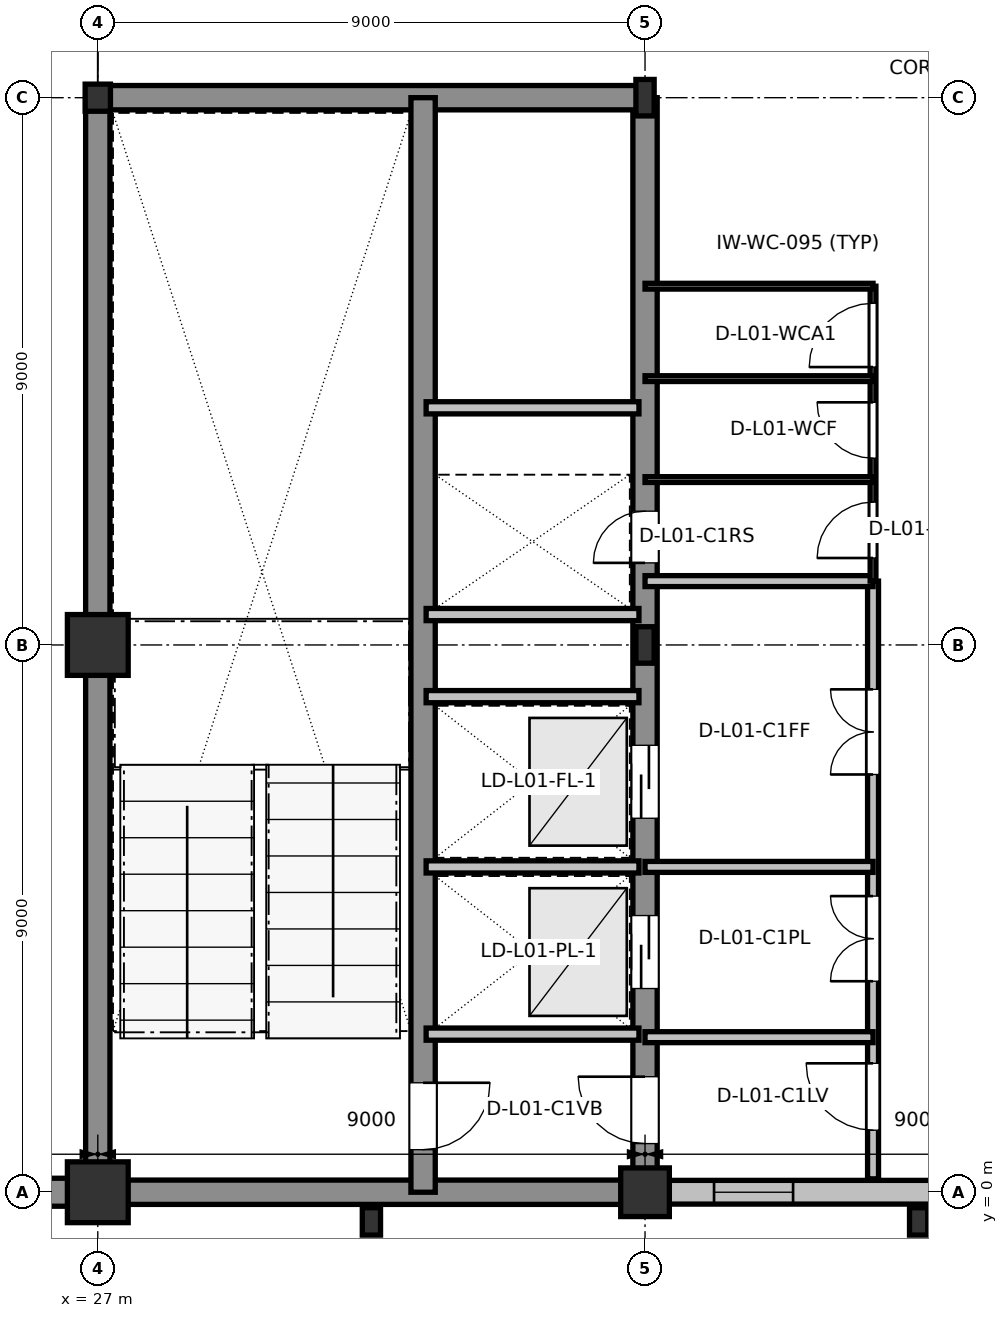
"""IFC4 building model, lengths in metres.
Left out: names, types, materials, properties, quantities, classifications, styles, units other than length and angle.
Written with IfcOpenShell. Run it as: python <this file> out.ifc"""

import sys

from ifc_helpers import new_model, si_unit, direction, frame, frame_2d, origin, origin_2d, place, context, subcontext, project, spatial, rectangle, i_section, extrude, element, fill, save


model = new_model("IFC4")
c1 = context("Model", 3, precision=1e-05, world=origin(), true_north=direction((0.0, 1.0)))
c2 = subcontext(c1, "Body", "Model", "MODEL_VIEW")
j1 = project(units=[si_unit("LENGTHUNIT", "METRE"), si_unit("PLANEANGLEUNIT", "RADIAN")], contexts=[c1])
p1 = place(None, origin())
s1 = spatial("IfcSite", under=j1, at=p1, CompositionType="ELEMENT")
p2 = place(p1, origin())
s2 = spatial("IfcBuilding", under=s1, at=p2, CompositionType="ELEMENT")
p3 = place(p2, frame((0.0, 0.0, 5.4)))
s3 = spatial("IfcBuildingStorey", under=s2, at=p3, CompositionType="ELEMENT", Elevation=5.4)
for number, where, z_axis, x_axis in (
    (1, (31.5, -0.48, 0.0), (0.0, 0.0, 1.0), (1.0, 0.0, 0.0)),
    (2, (40.5, -0.48, 0.0), (0.0, 0.0, 1.0), (1.0, 0.0, 0.0)),
):
    element("IfcColumn", number, at=place(p3, frame(where, z_axis=z_axis, x_axis=x_axis)), inside=s3, PredefinedType="PILASTER", context=c2, shape_type="SweptSolid", body=[
        extrude(rectangle(XDim=0.3, YDim=0.45, at=origin_2d()), origin(), (0.0, 0.0, 1.0), 4.8),
    ])
for number, where, z_axis, x_axis in (
    (3, (27.0, 0.0, 0.0), (0.0, 0.0, 1.0), (1.0, 0.0, 0.0)),
    (4, (27.0, 9.0, 0.0), (0.0, 0.0, 1.0), (1.0, 0.0, 0.0)),
):
    element("IfcColumn", number, at=place(p3, frame(where, z_axis=z_axis, x_axis=x_axis)), inside=s3, PredefinedType="COLUMN", context=c2, shape_type="SweptSolid", body=[
        extrude(rectangle(XDim=1.0, YDim=1.0, at=origin_2d()), origin(), (0.0, 0.0, 1.0), 4.8),
    ])
p4 = place(p3, frame((27.0, 18.0, 0.0), z_axis=(0.0, 0.0, 1.0), x_axis=(1.0, 0.0, 0.0)))
e5 = element("IfcColumn", 5, at=p4, inside=s3, PredefinedType="COLUMN", context=c2, shape_type="SweptSolid", body=[
    extrude(i_section(OverallWidth=0.416, OverallDepth=0.446, WebThickness=0.025, FlangeThickness=0.04, at=origin_2d()), origin(), (0.0, 0.0, 1.0), 4.8),
])
p5 = place(p3, frame((36.0, 0.0, 0.0), z_axis=(0.0, 0.0, 1.0), x_axis=(1.0, 0.0, 0.0)))
e6 = element("IfcColumn", 6, at=p5, inside=s3, PredefinedType="COLUMN", context=c2, shape_type="SweptSolid", body=[
    extrude(rectangle(XDim=0.8, YDim=0.8, at=origin_2d()), origin(), (0.0, 0.0, 1.0), 4.8),
])
for number, where, z_axis, x_axis in (
    (7, (36.0, 9.0, 0.0), (0.0, 0.0, 1.0), (1.0, 0.0, 0.0)),
    (8, (36.0, 18.0, 0.0), (0.0, 0.0, 1.0), (1.0, 0.0, 0.0)),
):
    element("IfcColumn", number, at=place(p3, frame(where, z_axis=z_axis, x_axis=x_axis)), inside=s3, PredefinedType="COLUMN", context=c2, shape_type="SweptSolid", body=[
        extrude(i_section(OverallWidth=0.3, OverallDepth=0.6, WebThickness=0.015, FlangeThickness=0.03, at=origin_2d()), origin(), (0.0, 0.0, 1.0), 4.8),
    ])
p6 = place(p3, frame((18.335, 0.0, 0.0), z_axis=(0.0, 0.0, 1.0), x_axis=(1.0, 0.0, 0.0)))
e9 = element("IfcWall", 9, at=p6, inside=s3, PredefinedType="STANDARD", context=c2, shape_type="SweptSolid", body=[
    extrude(rectangle(XDim=8.18, YDim=0.46, at=frame_2d((4.09, 0.0))), origin(), (0.0, 0.0, 1.0), 4.8),
])
p7 = place(p3, frame((36.385, 0.0, 0.0), z_axis=(0.0, 0.0, 1.0), x_axis=(1.0, 0.0, 0.0)))
e10 = element("IfcWall", 10, at=p7, inside=s3, PredefinedType="STANDARD", context=c2, shape_type="SweptSolid", body=[
    extrude(rectangle(XDim=8.23, YDim=0.39, at=frame_2d((4.115, 0.0))), origin(), (0.0, 0.0, 1.0), 3.495),
])
p8 = place(p7, frame((0.75, 0.0, 0.9)))
e11 = element("IfcOpeningElement", 11, at=p8, cuts=e10, PredefinedType="OPENING", context=c2, shape_type="SweptSolid", body=[
    extrude(rectangle(XDim=1.3, YDim=1.85, at=frame_2d((0.65, 0.925))), frame((0.0, 0.205, 0.0), z_axis=(0.0, -1.0, 0.0), x_axis=(1.0, 0.0, 0.0)), (0.0, 0.0, 1.0), 0.41),
])
p9 = place(p3, frame((27.0, 0.0, 0.0), z_axis=(0.0, 0.0, 1.0), x_axis=(1.0, 0.0, 0.0)))
e12 = element("IfcWall", 12, at=p9, inside=s3, PredefinedType="SHEAR", context=c2, shape_type="SweptSolid", body=[
    extrude(rectangle(XDim=9.0, YDim=0.4, at=frame_2d((4.5, 0.0))), origin(), (0.0, 0.0, 1.0), 4.56),
])
p10 = place(p3, frame((36.0, 0.0, 0.0), z_axis=(0.0, 0.0, 1.0), x_axis=(0.0, 1.0, 0.0)))
e13 = element("IfcWall", 13, at=p10, inside=s3, PredefinedType="SHEAR", context=c2, shape_type="SweptSolid", body=[
    extrude(rectangle(XDim=18.0, YDim=0.4, at=frame_2d((9.0, 0.0))), origin(), (0.0, 0.0, 1.0), 4.56),
])
p11 = place(p10, frame((0.8, 0.0, 0.0)))
e14 = element("IfcOpeningElement", 14, at=p11, cuts=e13, PredefinedType="OPENING", context=c2, shape_type="SweptSolid", body=[
    extrude(rectangle(XDim=1.1, YDim=2.16, at=frame_2d((0.55, 1.08))), frame((0.0, 0.21, 0.0), z_axis=(0.0, -1.0, 0.0), x_axis=(1.0, 0.0, 0.0)), (0.0, 0.0, 1.0), 0.42),
])
p12 = place(p10, frame((3.35, 0.0, 0.0)))
e15 = element("IfcOpeningElement", 15, at=p12, cuts=e13, PredefinedType="OPENING", context=c2, shape_type="SweptSolid", body=[
    extrude(rectangle(XDim=1.2, YDim=2.2, at=frame_2d((0.6, 1.1))), frame((0.0, 0.21, 0.0), z_axis=(0.0, -1.0, 0.0), x_axis=(1.0, 0.0, 0.0)), (0.0, 0.0, 1.0), 0.42),
])
p13 = place(p10, frame((6.15, 0.0, 0.0)))
e16 = element("IfcOpeningElement", 16, at=p13, cuts=e13, PredefinedType="OPENING", context=c2, shape_type="SweptSolid", body=[
    extrude(rectangle(XDim=1.2, YDim=2.2, at=frame_2d((0.6, 1.1))), frame((0.0, 0.21, 0.0), z_axis=(0.0, -1.0, 0.0), x_axis=(1.0, 0.0, 0.0)), (0.0, 0.0, 1.0), 0.42),
])
p14 = place(p10, frame((10.35, 0.0, 0.0)))
e17 = element("IfcOpeningElement", 17, at=p14, cuts=e13, PredefinedType="OPENING", context=c2, shape_type="SweptSolid", body=[
    extrude(rectangle(XDim=0.85, YDim=2.1, at=frame_2d((0.425, 1.05))), frame((0.0, 0.21, 0.0), z_axis=(0.0, -1.0, 0.0), x_axis=(1.0, 0.0, 0.0)), (0.0, 0.0, 1.0), 0.42),
])
p15 = place(p3, frame((36.0, 18.0, 0.0), z_axis=(0.0, 0.0, 1.0), x_axis=(-1.0, 0.0, 0.0)))
e18 = element("IfcWall", 18, at=p15, inside=s3, PredefinedType="SHEAR", context=c2, shape_type="SweptSolid", body=[
    extrude(rectangle(XDim=9.0, YDim=0.4, at=frame_2d((4.5, 0.0))), origin(), (0.0, 0.0, 1.0), 4.56),
])
p16 = place(p3, frame((27.0, 18.0, 0.0), z_axis=(0.0, 0.0, 1.0), x_axis=(0.0, -1.0, 0.0)))
e19 = element("IfcWall", 19, at=p16, inside=s3, PredefinedType="SHEAR", context=c2, shape_type="SweptSolid", body=[
    extrude(rectangle(XDim=18.0, YDim=0.4, at=frame_2d((9.0, 0.0))), origin(), (0.0, 0.0, 1.0), 4.56),
])
p17 = place(p3, frame((32.35, 0.0, 0.0), z_axis=(0.0, 0.0, 1.0), x_axis=(0.0, 1.0, 0.0)))
e20 = element("IfcWall", 20, at=p17, inside=s3, PredefinedType="SHEAR", context=c2, shape_type="SweptSolid", body=[
    extrude(rectangle(XDim=18.0, YDim=0.4, at=frame_2d((9.0, 0.0))), origin(), (0.0, 0.0, 1.0), 4.56),
])
p18 = place(p17, frame((0.7, 0.0, 0.0)))
e21 = element("IfcOpeningElement", 21, at=p18, cuts=e20, PredefinedType="OPENING", context=c2, shape_type="SweptSolid", body=[
    extrude(rectangle(XDim=1.1, YDim=2.16, at=frame_2d((0.55, 1.08))), frame((0.0, 0.21, 0.0), z_axis=(0.0, -1.0, 0.0), x_axis=(1.0, 0.0, 0.0)), (0.0, 0.0, 1.0), 0.42),
])
for number, where, z_axis, x_axis in (
    (22, (32.4, 2.6, 0.0), (0.0, 0.0, 1.0), (1.0, 0.0, 0.0)),
    (23, (32.4, 5.35, 0.0), (0.0, 0.0, 1.0), (1.0, 0.0, 0.0)),
    (24, (32.4, 8.15, 0.0), (0.0, 0.0, 1.0), (1.0, 0.0, 0.0)),
    (25, (32.4, 9.5, 0.0), (0.0, 0.0, 1.0), (1.0, 0.0, 0.0)),
    (26, (32.4, 12.9, 0.0), (0.0, 0.0, 1.0), (1.0, 0.0, 0.0)),
):
    element("IfcWall", number, at=place(p3, frame(where, z_axis=z_axis, x_axis=x_axis)), inside=s3, PredefinedType="PARTITIONING", context=c2, shape_type="SweptSolid", body=[
        extrude(rectangle(XDim=3.5, YDim=0.2, at=frame_2d((1.75, 0.0))), origin(), (0.0, 0.0, 1.0), 4.56),
    ])
p19 = place(p3, frame((39.75, 0.22, 0.0), z_axis=(0.0, 0.0, 1.0), x_axis=(0.0, 1.0, 0.0)))
e27 = element("IfcWall", 27, at=p19, inside=s3, PredefinedType="PARTITIONING", context=c2, shape_type="SweptSolid", body=[
    extrude(rectangle(XDim=9.83, YDim=0.18, at=frame_2d((4.915, 0.0))), origin(), (0.0, 0.0, 1.0), 4.56),
])
p20 = place(p19, frame((0.8, 0.0, 0.0)))
e28 = element("IfcOpeningElement", 28, at=p20, cuts=e27, PredefinedType="OPENING", context=c2, shape_type="SweptSolid", body=[
    extrude(rectangle(XDim=1.1, YDim=2.16, at=frame_2d((0.55, 1.08))), frame((0.0, 0.1, 0.0), z_axis=(0.0, -1.0, 0.0), x_axis=(1.0, 0.0, 0.0)), (0.0, 0.0, 1.0), 0.2),
])
p21 = place(p19, frame((3.25, 0.0, 0.0)))
e29 = element("IfcOpeningElement", 29, at=p21, cuts=e27, PredefinedType="OPENING", context=c2, shape_type="SweptSolid", body=[
    extrude(rectangle(XDim=1.4, YDim=2.2, at=frame_2d((0.7, 1.1))), frame((0.0, 0.1, 0.0), z_axis=(0.0, -1.0, 0.0), x_axis=(1.0, 0.0, 0.0)), (0.0, 0.0, 1.0), 0.2),
])
p22 = place(p19, frame((6.65, 0.0, 0.0)))
e30 = element("IfcOpeningElement", 30, at=p22, cuts=e27, PredefinedType="OPENING", context=c2, shape_type="SweptSolid", body=[
    extrude(rectangle(XDim=1.4, YDim=2.2, at=frame_2d((0.7, 1.1))), frame((0.0, 0.1, 0.0), z_axis=(0.0, -1.0, 0.0), x_axis=(1.0, 0.0, 0.0)), (0.0, 0.0, 1.0), 0.2),
])
for number, where, z_axis, x_axis in (
    (31, (36.0, 2.55, 0.0), (0.0, 0.0, 1.0), (1.0, 0.0, 0.0)),
    (32, (36.0, 5.35, 0.0), (0.0, 0.0, 1.0), (1.0, 0.0, 0.0)),
    (33, (36.0, 10.05, 0.0), (0.0, 0.0, 1.0), (1.0, 0.0, 0.0)),
):
    element("IfcWall", number, at=place(p3, frame(where, z_axis=z_axis, x_axis=x_axis)), inside=s3, PredefinedType="PARTITIONING", context=c2, shape_type="SweptSolid", body=[
        extrude(rectangle(XDim=3.75, YDim=0.18, at=frame_2d((1.875, 0.0))), origin(), (0.0, 0.0, 1.0), 4.56),
    ])
p23 = place(p3, frame((39.75, 10.05, 0.0), z_axis=(0.0, 0.0, 1.0), x_axis=(0.0, 1.0, 0.0)))
e34 = element("IfcWall", 34, at=p23, inside=s3, PredefinedType="PARTITIONING", context=c2, shape_type="SweptSolid", body=[
    extrude(rectangle(XDim=4.85, YDim=0.095, at=frame_2d((2.425, 0.0))), origin(), (0.0, 0.0, 1.0), 4.56),
])
p24 = place(p23, frame((0.38, 0.0, 0.0)))
e35 = element("IfcOpeningElement", 35, at=p24, cuts=e34, PredefinedType="OPENING", context=c2, shape_type="SweptSolid", body=[
    extrude(rectangle(XDim=0.92, YDim=2.1, at=frame_2d((0.46, 1.05))), frame((0.0, 0.057, 0.0), z_axis=(0.0, -1.0, 0.0), x_axis=(1.0, 0.0, 0.0)), (0.0, 0.0, 1.0), 0.115),
])
p25 = place(p23, frame((2.02, 0.0, 0.0)))
e36 = element("IfcOpeningElement", 36, at=p25, cuts=e34, PredefinedType="OPENING", context=c2, shape_type="SweptSolid", body=[
    extrude(rectangle(XDim=0.92, YDim=2.1, at=frame_2d((0.46, 1.05))), frame((0.0, 0.057, 0.0), z_axis=(0.0, -1.0, 0.0), x_axis=(1.0, 0.0, 0.0)), (0.0, 0.0, 1.0), 0.115),
])
p26 = place(p23, frame((3.52, 0.0, 0.0)))
e37 = element("IfcOpeningElement", 37, at=p26, cuts=e34, PredefinedType="OPENING", context=c2, shape_type="SweptSolid", body=[
    extrude(rectangle(XDim=1.05, YDim=2.13, at=frame_2d((0.525, 1.065))), frame((0.0, 0.057, 0.0), z_axis=(0.0, -1.0, 0.0), x_axis=(1.0, 0.0, 0.0)), (0.0, 0.0, 1.0), 0.115),
])
for number, where, z_axis, x_axis in (
    (38, (36.0, 11.72, 0.0), (0.0, 0.0, 1.0), (1.0, 0.0, 0.0)),
    (39, (36.0, 13.38, 0.0), (0.0, 0.0, 1.0), (1.0, 0.0, 0.0)),
):
    element("IfcWall", number, at=place(p3, frame(where, z_axis=z_axis, x_axis=x_axis)), inside=s3, PredefinedType="PARTITIONING", context=c2, shape_type="SweptSolid", body=[
        extrude(rectangle(XDim=3.75, YDim=0.095, at=frame_2d((1.875, 0.0))), origin(), (0.0, 0.0, 1.0), 4.56),
    ])
p27 = place(p3, frame((36.0, 14.9, 0.0), z_axis=(0.0, 0.0, 1.0), x_axis=(1.0, 0.0, 0.0)))
e40 = element("IfcWall", 40, at=p27, inside=s3, PredefinedType="PARTITIONING", context=c2, shape_type="SweptSolid", body=[
    extrude(rectangle(XDim=3.75, YDim=0.095, at=frame_2d((1.875, 0.0))), origin(), (0.0, 0.0, 1.0), 4.185),
])
p28 = place(p8, origin())
e41 = element("IfcWindow", 41, at=p28, inside=s3, PartitioningType="SINGLE_PANEL", PredefinedType="WINDOW", context=c2, shape_type="SweptSolid", body=[
    extrude(rectangle(XDim=1.3, YDim=1.85, at=frame_2d((0.65, 0.925))), frame((0.0, 0.03, 0.0), z_axis=(0.0, -1.0, 0.0), x_axis=(1.0, 0.0, 0.0)), (0.0, 0.0, 1.0), 0.06),
])
fill(e11, e41)
p29 = place(p18, frame((1.1, 0.0, 0.0), z_axis=(0.0, 0.0, 1.0), x_axis=(-1.0, 0.0, 0.0)))
e42 = element("IfcDoor", 42, at=p29, inside=s3, OperationType="SINGLE_SWING_LEFT", PredefinedType="DOOR", context=c2, shape_type="SweptSolid", body=[
    extrude(rectangle(XDim=1.1, YDim=2.16, at=frame_2d((0.55, 1.08))), frame((0.0, 0.025, 0.0), z_axis=(0.0, -1.0, 0.0), x_axis=(1.0, 0.0, 0.0)), (0.0, 0.0, 1.0), 0.05),
])
fill(e21, e42)
p30 = place(p11, origin())
e43 = element("IfcDoor", 43, at=p30, inside=s3, OperationType="SINGLE_SWING_RIGHT", PredefinedType="DOOR", context=c2, shape_type="SweptSolid", body=[
    extrude(rectangle(XDim=1.1, YDim=2.16, at=frame_2d((0.55, 1.08))), frame((0.0, 0.025, 0.0), z_axis=(0.0, -1.0, 0.0), x_axis=(1.0, 0.0, 0.0)), (0.0, 0.0, 1.0), 0.05),
])
fill(e14, e43)
p31 = place(p12, origin())
e44 = element("IfcDoor", 44, at=p31, inside=s3, OperationType="SLIDING_TO_LEFT", PredefinedType="DOOR", context=c2, shape_type="SweptSolid", body=[
    extrude(rectangle(XDim=1.2, YDim=2.2, at=frame_2d((0.6, 1.1))), frame((0.0, 0.025, 0.0), z_axis=(0.0, -1.0, 0.0), x_axis=(1.0, 0.0, 0.0)), (0.0, 0.0, 1.0), 0.05),
])
fill(e15, e44)
p32 = place(p13, origin())
e45 = element("IfcDoor", 45, at=p32, inside=s3, OperationType="SLIDING_TO_LEFT", PredefinedType="DOOR", context=c2, shape_type="SweptSolid", body=[
    extrude(rectangle(XDim=1.2, YDim=2.2, at=frame_2d((0.6, 1.1))), frame((0.0, 0.025, 0.0), z_axis=(0.0, -1.0, 0.0), x_axis=(1.0, 0.0, 0.0)), (0.0, 0.0, 1.0), 0.05),
])
fill(e16, e45)
p33 = place(p14, origin())
e46 = element("IfcDoor", 46, at=p33, inside=s3, OperationType="SINGLE_SWING_LEFT", PredefinedType="DOOR", context=c2, shape_type="SweptSolid", body=[
    extrude(rectangle(XDim=0.85, YDim=2.1, at=frame_2d((0.425, 1.05))), frame((0.0, 0.025, 0.0), z_axis=(0.0, -1.0, 0.0), x_axis=(1.0, 0.0, 0.0)), (0.0, 0.0, 1.0), 0.05),
])
fill(e17, e46)
p34 = place(p20, origin())
e47 = element("IfcDoor", 47, at=p34, inside=s3, OperationType="SINGLE_SWING_RIGHT", PredefinedType="DOOR", context=c2, shape_type="SweptSolid", body=[
    extrude(rectangle(XDim=1.1, YDim=2.16, at=frame_2d((0.55, 1.08))), frame((0.0, 0.025, 0.0), z_axis=(0.0, -1.0, 0.0), x_axis=(1.0, 0.0, 0.0)), (0.0, 0.0, 1.0), 0.05),
])
fill(e28, e47)
p35 = place(p21, origin())
e48 = element("IfcDoor", 48, at=p35, inside=s3, OperationType="DOUBLE_DOOR_SINGLE_SWING", PredefinedType="DOOR", context=c2, shape_type="SweptSolid", body=[
    extrude(rectangle(XDim=1.4, YDim=2.2, at=frame_2d((0.7, 1.1))), frame((0.0, 0.025, 0.0), z_axis=(0.0, -1.0, 0.0), x_axis=(1.0, 0.0, 0.0)), (0.0, 0.0, 1.0), 0.05),
])
fill(e29, e48)
p36 = place(p22, origin())
e49 = element("IfcDoor", 49, at=p36, inside=s3, OperationType="DOUBLE_DOOR_SINGLE_SWING", PredefinedType="DOOR", context=c2, shape_type="SweptSolid", body=[
    extrude(rectangle(XDim=1.4, YDim=2.2, at=frame_2d((0.7, 1.1))), frame((0.0, 0.025, 0.0), z_axis=(0.0, -1.0, 0.0), x_axis=(1.0, 0.0, 0.0)), (0.0, 0.0, 1.0), 0.05),
])
fill(e30, e49)
p37 = place(p24, origin())
e50 = element("IfcDoor", 50, at=p37, inside=s3, OperationType="SINGLE_SWING_LEFT", PredefinedType="DOOR", context=c2, shape_type="SweptSolid", body=[
    extrude(rectangle(XDim=0.92, YDim=2.1, at=frame_2d((0.46, 1.05))), frame((0.0, 0.025, 0.0), z_axis=(0.0, -1.0, 0.0), x_axis=(1.0, 0.0, 0.0)), (0.0, 0.0, 1.0), 0.05),
])
fill(e35, e50)
p38 = place(p25, origin())
e51 = element("IfcDoor", 51, at=p38, inside=s3, OperationType="SINGLE_SWING_RIGHT", PredefinedType="DOOR", context=c2, shape_type="SweptSolid", body=[
    extrude(rectangle(XDim=0.92, YDim=2.1, at=frame_2d((0.46, 1.05))), frame((0.0, 0.025, 0.0), z_axis=(0.0, -1.0, 0.0), x_axis=(1.0, 0.0, 0.0)), (0.0, 0.0, 1.0), 0.05),
])
fill(e36, e51)
p39 = place(p26, origin())
e52 = element("IfcDoor", 52, at=p39, inside=s3, OperationType="SINGLE_SWING_LEFT", PredefinedType="DOOR", context=c2, shape_type="SweptSolid", body=[
    extrude(rectangle(XDim=1.05, YDim=2.13, at=frame_2d((0.525, 1.065))), frame((0.0, 0.025, 0.0), z_axis=(0.0, -1.0, 0.0), x_axis=(1.0, 0.0, 0.0)), (0.0, 0.0, 1.0), 0.05),
])
fill(e37, e52)
save(model, sys.argv[1])
